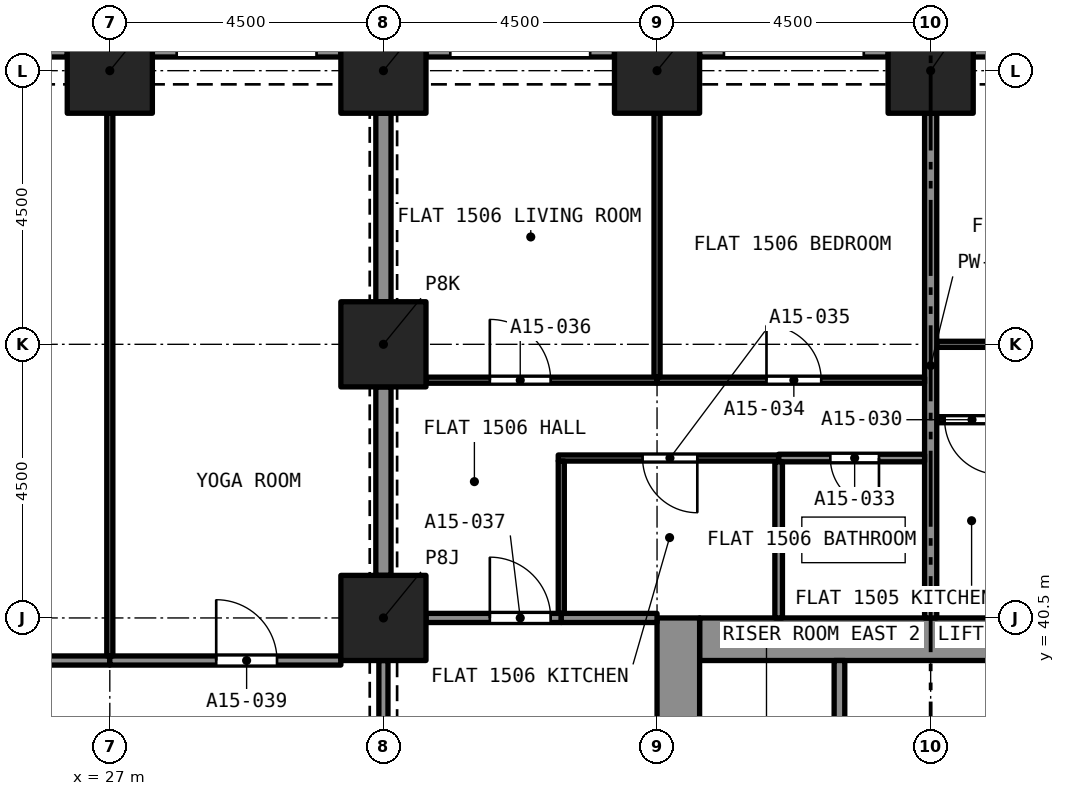
"""IFC4 building model, lengths in metres.
Left out: names, types, materials, properties, quantities, classifications, styles, units other than length and angle.
Written with IfcOpenShell. Run it as: python <this file> out.ifc"""

import sys

from ifc_helpers import new_model, si_unit, direction, frame, frame_2d, origin, origin_2d, place, context, subcontext, project, spatial, rectangle, extrude, element, fill, save


model = new_model("IFC4")
c1 = context("Model", 3, precision=1e-05, world=origin(), true_north=direction((0.0, 1.0)))
c2 = subcontext(c1, "Body", "Model", "MODEL_VIEW")
j1 = project(units=[si_unit("LENGTHUNIT", "METRE"), si_unit("PLANEANGLEUNIT", "RADIAN")], contexts=[c1])
p1 = place(None, origin())
s1 = spatial("IfcSite", under=j1, at=p1, CompositionType="ELEMENT")
p2 = place(p1, origin())
s2 = spatial("IfcBuilding", under=s1, at=p2, CompositionType="ELEMENT")
p3 = place(p2, frame((0.0, 0.0, 59.2)))
s3 = spatial("IfcBuildingStorey", under=s2, at=p3, CompositionType="ELEMENT", Elevation=59.2)
for number, where, z_axis, x_axis in (
    (1, (31.5, 40.5, 0.0), (0.0, 0.0, 1.0), (1.0, 0.0, 0.0)),
    (2, (31.5, 45.0, 0.0), (0.0, 0.0, 1.0), (1.0, 0.0, 0.0)),
    (3, (27.0, 49.5, 0.0), (0.0, 0.0, 1.0), (1.0, 0.0, 0.0)),
    (4, (31.5, 49.5, 0.0), (0.0, 0.0, 1.0), (1.0, 0.0, 0.0)),
    (5, (36.0, 49.5, 0.0), (0.0, 0.0, 1.0), (1.0, 0.0, 0.0)),
    (6, (40.5, 49.5, 0.0), (0.0, 0.0, 1.0), (1.0, 0.0, 0.0)),
):
    element("IfcColumn", number, at=place(p3, frame(where, z_axis=z_axis, x_axis=x_axis)), inside=s3, PredefinedType="COLUMN", context=c2, shape_type="SweptSolid", body=[
        extrude(rectangle(XDim=1.4, YDim=1.4, at=origin_2d()), origin(), (0.0, 0.0, 1.0), 3.2),
    ])
p4 = place(p3, frame((36.7, 40.15, 0.0), z_axis=(0.0, 0.0, 1.0), x_axis=(1.0, 0.0, 0.0)))
e7 = element("IfcWall", 7, at=p4, inside=s3, PredefinedType="SOLIDWALL", context=c2, shape_type="SweptSolid", body=[
    extrude(rectangle(XDim=7.6, YDim=0.7, at=frame_2d((3.8, 0.0))), origin(), (0.0, 0.0, 1.0), 3.2),
])
p5 = place(p3, frame((36.35, 27.0, 0.0), z_axis=(0.0, 0.0, 1.0), x_axis=(0.0, 1.0, 0.0)))
e8 = element("IfcWall", 8, at=p5, inside=s3, PredefinedType="SOLIDWALL", context=c2, shape_type="SweptSolid", body=[
    extrude(rectangle(XDim=13.5, YDim=0.7, at=frame_2d((6.75, 0.0))), origin(), (0.0, 0.0, 1.0), 3.2),
])
p6 = place(p5, frame((8.95, 0.0, 0.0)))
e9 = element("IfcOpeningElement", 9, at=p6, cuts=e8, PredefinedType="OPENING", context=c2, shape_type="SweptSolid", body=[
    extrude(rectangle(XDim=1.2, YDim=2.1, at=frame_2d((0.6, 1.05))), frame((0.0, 0.36, 0.0), z_axis=(0.0, -1.0, 0.0), x_axis=(1.0, 0.0, 0.0)), (0.0, 0.0, 1.0), 0.72),
])
p7 = place(p3, frame((41.2, 49.875, 0.0), z_axis=(0.0, 0.0, 1.0), x_axis=(1.0, 0.0, 0.0)))
e10 = element("IfcWall", 10, at=p7, inside=s3, PredefinedType="SOLIDWALL", context=c2, shape_type="SweptSolid", body=[
    extrude(rectangle(XDim=3.1, YDim=0.3, at=frame_2d((1.55, 0.0))), origin(), (0.0, 0.0, 1.0), 3.2),
])
p8 = place(p7, frame((0.4, 0.0, 0.45)))
e11 = element("IfcOpeningElement", 11, at=p8, cuts=e10, PredefinedType="OPENING", context=c2, shape_type="SweptSolid", body=[
    extrude(rectangle(XDim=2.3, YDim=1.95, at=frame_2d((1.15, 0.975))), frame((0.0, 0.16, 0.0), z_axis=(0.0, -1.0, 0.0), x_axis=(1.0, 0.0, 0.0)), (0.0, 0.0, 1.0), 0.32),
])
p9 = place(p3, frame((36.7, 49.875, 0.0), z_axis=(0.0, 0.0, 1.0), x_axis=(1.0, 0.0, 0.0)))
e12 = element("IfcWall", 12, at=p9, inside=s3, PredefinedType="SOLIDWALL", context=c2, shape_type="SweptSolid", body=[
    extrude(rectangle(XDim=3.1, YDim=0.3, at=frame_2d((1.55, 0.0))), origin(), (0.0, 0.0, 1.0), 3.2),
])
p10 = place(p9, frame((0.4, 0.0, 0.45)))
e13 = element("IfcOpeningElement", 13, at=p10, cuts=e12, PredefinedType="OPENING", context=c2, shape_type="SweptSolid", body=[
    extrude(rectangle(XDim=2.3, YDim=1.95, at=frame_2d((1.15, 0.975))), frame((0.0, 0.16, 0.0), z_axis=(0.0, -1.0, 0.0), x_axis=(1.0, 0.0, 0.0)), (0.0, 0.0, 1.0), 0.32),
])
p11 = place(p3, frame((32.2, 49.875, 0.0), z_axis=(0.0, 0.0, 1.0), x_axis=(1.0, 0.0, 0.0)))
e14 = element("IfcWall", 14, at=p11, inside=s3, PredefinedType="SOLIDWALL", context=c2, shape_type="SweptSolid", body=[
    extrude(rectangle(XDim=3.1, YDim=0.3, at=frame_2d((1.55, 0.0))), origin(), (0.0, 0.0, 1.0), 3.2),
])
p12 = place(p11, frame((0.4, 0.0, 0.45)))
e15 = element("IfcOpeningElement", 15, at=p12, cuts=e14, PredefinedType="OPENING", context=c2, shape_type="SweptSolid", body=[
    extrude(rectangle(XDim=2.3, YDim=1.95, at=frame_2d((1.15, 0.975))), frame((0.0, 0.16, 0.0), z_axis=(0.0, -1.0, 0.0), x_axis=(1.0, 0.0, 0.0)), (0.0, 0.0, 1.0), 0.32),
])
p13 = place(p3, frame((27.7, 49.875, 0.0), z_axis=(0.0, 0.0, 1.0), x_axis=(1.0, 0.0, 0.0)))
e16 = element("IfcWall", 16, at=p13, inside=s3, PredefinedType="SOLIDWALL", context=c2, shape_type="SweptSolid", body=[
    extrude(rectangle(XDim=3.1, YDim=0.3, at=frame_2d((1.55, 0.0))), origin(), (0.0, 0.0, 1.0), 3.2),
])
p14 = place(p13, frame((0.4, 0.0, 0.45)))
e17 = element("IfcOpeningElement", 17, at=p14, cuts=e16, PredefinedType="OPENING", context=c2, shape_type="SweptSolid", body=[
    extrude(rectangle(XDim=2.3, YDim=1.95, at=frame_2d((1.15, 0.975))), frame((0.0, 0.16, 0.0), z_axis=(0.0, -1.0, 0.0), x_axis=(1.0, 0.0, 0.0)), (0.0, 0.0, 1.0), 0.32),
])
p15 = place(p3, frame((23.2, 49.875, 0.0), z_axis=(0.0, 0.0, 1.0), x_axis=(1.0, 0.0, 0.0)))
e18 = element("IfcWall", 18, at=p15, inside=s3, PredefinedType="SOLIDWALL", context=c2, shape_type="SweptSolid", body=[
    extrude(rectangle(XDim=3.1, YDim=0.3, at=frame_2d((1.55, 0.0))), origin(), (0.0, 0.0, 1.0), 3.2),
])
p16 = place(p15, frame((0.4, 0.0, 0.45)))
e19 = element("IfcOpeningElement", 19, at=p16, cuts=e18, PredefinedType="OPENING", context=c2, shape_type="SweptSolid", body=[
    extrude(rectangle(XDim=2.3, YDim=1.95, at=frame_2d((1.15, 0.975))), frame((0.0, 0.16, 0.0), z_axis=(0.0, -1.0, 0.0), x_axis=(1.0, 0.0, 0.0)), (0.0, 0.0, 1.0), 0.32),
])
p17 = place(p3, frame((40.6, 45.0, 0.0), z_axis=(0.0, 0.0, 1.0), x_axis=(1.0, 0.0, 0.0)))
e20 = element("IfcWall", 20, at=p17, inside=s3, PredefinedType="PARTITIONING", context=c2, shape_type="SweptSolid", body=[
    extrude(rectangle(XDim=4.4, YDim=0.1, at=frame_2d((2.2, 0.0))), origin(), (0.0, 0.0, 1.0), 2.9),
])
p18 = place(p17, frame((1.7, 0.0, 0.0)))
e21 = element("IfcOpeningElement", 21, at=p18, cuts=e20, PredefinedType="OPENING", context=c2, shape_type="SweptSolid", body=[
    extrude(rectangle(XDim=0.9, YDim=2.1, at=frame_2d((0.45, 1.05))), frame((0.0, 0.06, 0.0), z_axis=(0.0, -1.0, 0.0), x_axis=(1.0, 0.0, 0.0)), (0.0, 0.0, 1.0), 0.12),
])
p19 = place(p3, frame((41.809, 43.76, 0.0), z_axis=(0.0, 0.0, 1.0), x_axis=(-1.0, 0.0, 0.0)))
e22 = element("IfcWall", 22, at=p19, inside=s3, PredefinedType="PARTITIONING", context=c2, shape_type="SweptSolid", body=[
    extrude(rectangle(XDim=1.209, YDim=0.1, at=frame_2d((0.604, 0.0))), origin(), (0.0, 0.0, 1.0), 2.9),
])
p20 = place(p19, frame((0.179, 0.0, 0.0)))
e23 = element("IfcOpeningElement", 23, at=p20, cuts=e22, PredefinedType="OPENING", context=c2, shape_type="SweptSolid", body=[
    extrude(rectangle(XDim=0.9, YDim=2.1, at=frame_2d((0.45, 1.05))), frame((0.0, 0.06, 0.0), z_axis=(0.0, -1.0, 0.0), x_axis=(1.0, 0.0, 0.0)), (0.0, 0.0, 1.0), 0.12),
])
p21 = place(p3, frame((40.5, 40.5, 0.0), z_axis=(0.0, 0.0, 1.0), x_axis=(0.0, 1.0, 0.0)))
e24 = element("IfcWall", 24, at=p21, inside=s3, PredefinedType="PARTITIONING", context=c2, shape_type="SweptSolid", body=[
    extrude(rectangle(XDim=8.3, YDim=0.2, at=frame_2d((4.15, 0.0))), origin(), (0.0, 0.0, 1.0), 2.9),
])
p22 = place(p3, frame((40.4, 43.13, 0.0), z_axis=(0.0, 0.0, 1.0), x_axis=(-1.0, 0.0, 0.0)))
e25 = element("IfcWall", 25, at=p22, inside=s3, PredefinedType="PARTITIONING", context=c2, shape_type="SweptSolid", body=[
    extrude(rectangle(XDim=2.4, YDim=0.125, at=frame_2d((1.2, 0.0))), origin(), (0.0, 0.0, 1.0), 2.9),
])
p23 = place(p22, frame((0.75, 0.0, 0.0)))
e26 = element("IfcOpeningElement", 26, at=p23, cuts=e25, PredefinedType="OPENING", context=c2, shape_type="SweptSolid", body=[
    extrude(rectangle(XDim=0.8, YDim=2.1, at=frame_2d((0.4, 1.05))), frame((0.0, 0.073, 0.0), z_axis=(0.0, -1.0, 0.0), x_axis=(1.0, 0.0, 0.0)), (0.0, 0.0, 1.0), 0.145),
])
p24 = place(p3, frame((38.0, 40.5, 0.0), z_axis=(0.0, 0.0, 1.0), x_axis=(0.0, 1.0, 0.0)))
e27 = element("IfcWall", 27, at=p24, inside=s3, PredefinedType="PARTITIONING", context=c2, shape_type="SweptSolid", body=[
    extrude(rectangle(XDim=2.567, YDim=0.125, at=frame_2d((1.284, 0.0))), origin(), (0.0, 0.0, 1.0), 2.9),
])
p25 = place(p3, frame((36.0, 44.41, 0.0), z_axis=(0.0, 0.0, 1.0), x_axis=(1.0, 0.0, 0.0)))
e28 = element("IfcWall", 28, at=p25, inside=s3, PredefinedType="PARTITIONING", context=c2, shape_type="SweptSolid", body=[
    extrude(rectangle(XDim=4.4, YDim=0.1, at=frame_2d((2.2, 0.0))), origin(), (0.0, 0.0, 1.0), 2.9),
])
p26 = place(p25, frame((1.8, 0.0, 0.0)))
e29 = element("IfcOpeningElement", 29, at=p26, cuts=e28, PredefinedType="OPENING", context=c2, shape_type="SweptSolid", body=[
    extrude(rectangle(XDim=0.9, YDim=2.1, at=frame_2d((0.45, 1.05))), frame((0.0, 0.06, 0.0), z_axis=(0.0, -1.0, 0.0), x_axis=(1.0, 0.0, 0.0)), (0.0, 0.0, 1.0), 0.12),
])
p27 = place(p3, frame((36.0, 44.46, 0.0), z_axis=(0.0, 0.0, 1.0), x_axis=(0.0, 1.0, 0.0)))
e30 = element("IfcWall", 30, at=p27, inside=s3, PredefinedType="PARTITIONING", context=c2, shape_type="SweptSolid", body=[
    extrude(rectangle(XDim=4.34, YDim=0.1, at=frame_2d((2.17, 0.0))), origin(), (0.0, 0.0, 1.0), 2.9),
])
p28 = place(p3, frame((38.0, 43.13, 0.0), z_axis=(0.0, 0.0, 1.0), x_axis=(-1.0, 0.0, 0.0)))
e31 = element("IfcWall", 31, at=p28, inside=s3, PredefinedType="PARTITIONING", context=c2, shape_type="SweptSolid", body=[
    extrude(rectangle(XDim=3.625, YDim=0.1, at=frame_2d((1.812, 0.0))), origin(), (0.0, 0.0, 1.0), 2.9),
])
p29 = place(p28, frame((1.337, 0.0, 0.0)))
e32 = element("IfcOpeningElement", 32, at=p29, cuts=e31, PredefinedType="OPENING", context=c2, shape_type="SweptSolid", body=[
    extrude(rectangle(XDim=0.9, YDim=2.1, at=frame_2d((0.45, 1.05))), frame((0.0, 0.06, 0.0), z_axis=(0.0, -1.0, 0.0), x_axis=(1.0, 0.0, 0.0)), (0.0, 0.0, 1.0), 0.12),
])
p30 = place(p3, frame((34.425, 40.575, 0.0), z_axis=(0.0, 0.0, 1.0), x_axis=(0.0, 1.0, 0.0)))
e33 = element("IfcWall", 33, at=p30, inside=s3, PredefinedType="PARTITIONING", context=c2, shape_type="SweptSolid", body=[
    extrude(rectangle(XDim=2.505, YDim=0.1, at=frame_2d((1.252, 0.0))), origin(), (0.0, 0.0, 1.0), 2.9),
])
p31 = place(p3, frame((32.2, 44.41, 0.0), z_axis=(0.0, 0.0, 1.0), x_axis=(1.0, 0.0, 0.0)))
e34 = element("IfcWall", 34, at=p31, inside=s3, PredefinedType="PARTITIONING", context=c2, shape_type="SweptSolid", body=[
    extrude(rectangle(XDim=3.8, YDim=0.1, at=frame_2d((1.9, 0.0))), origin(), (0.0, 0.0, 1.0), 2.9),
])
p32 = place(p31, frame((1.05, 0.0, 0.0)))
e35 = element("IfcOpeningElement", 35, at=p32, cuts=e34, PredefinedType="OPENING", context=c2, shape_type="SweptSolid", body=[
    extrude(rectangle(XDim=1.0, YDim=2.1, at=frame_2d((0.5, 1.05))), frame((0.0, 0.06, 0.0), z_axis=(0.0, -1.0, 0.0), x_axis=(1.0, 0.0, 0.0)), (0.0, 0.0, 1.0), 0.12),
])
p33 = place(p3, frame((31.5, 41.2, 0.0), z_axis=(0.0, 0.0, 1.0), x_axis=(0.0, 1.0, 0.0)))
e36 = element("IfcWall", 36, at=p33, inside=s3, PredefinedType="PARTITIONING", context=c2, shape_type="SweptSolid", body=[
    extrude(rectangle(XDim=3.1, YDim=0.25, at=frame_2d((1.55, 0.0))), origin(), (0.0, 0.0, 1.0), 2.38),
])
p34 = place(p3, frame((32.2, 40.5, 0.0), z_axis=(0.0, 0.0, 1.0), x_axis=(1.0, 0.0, 0.0)))
e37 = element("IfcWall", 37, at=p34, inside=s3, PredefinedType="PARTITIONING", context=c2, shape_type="SweptSolid", body=[
    extrude(rectangle(XDim=2.225, YDim=0.15, at=frame_2d((1.113, 0.0))), origin(), (0.0, 0.0, 1.0), 2.9),
])
p35 = place(p34, frame((1.05, 0.0, 0.0)))
e38 = element("IfcOpeningElement", 38, at=p35, cuts=e37, PredefinedType="OPENING", context=c2, shape_type="SweptSolid", body=[
    extrude(rectangle(XDim=1.0, YDim=2.1, at=frame_2d((0.5, 1.05))), frame((0.0, 0.085, 0.0), z_axis=(0.0, -1.0, 0.0), x_axis=(1.0, 0.0, 0.0)), (0.0, 0.0, 1.0), 0.17),
])
p36 = place(p3, frame((34.425, 40.5, 0.0), z_axis=(0.0, 0.0, 1.0), x_axis=(1.0, 0.0, 0.0)))
e39 = element("IfcWall", 39, at=p36, inside=s3, PredefinedType="PARTITIONING", context=c2, shape_type="SweptSolid", body=[
    extrude(rectangle(XDim=1.575, YDim=0.15, at=frame_2d((0.788, 0.0))), origin(), (0.0, 0.0, 1.0), 2.9),
])
p37 = place(p3, frame((31.5, 45.7, 0.0), z_axis=(0.0, 0.0, 1.0), x_axis=(0.0, 1.0, 0.0)))
e40 = element("IfcWall", 40, at=p37, inside=s3, PredefinedType="PARTITIONING", context=c2, shape_type="SweptSolid", body=[
    extrude(rectangle(XDim=3.1, YDim=0.25, at=frame_2d((1.55, 0.0))), origin(), (0.0, 0.0, 1.0), 2.38),
])
p38 = place(p3, frame((18.7, 39.8, 0.0), z_axis=(0.0, 0.0, 1.0), x_axis=(1.0, 0.0, 0.0)))
e41 = element("IfcWall", 41, at=p38, inside=s3, PredefinedType="PARTITIONING", context=c2, shape_type="SweptSolid", body=[
    extrude(rectangle(XDim=8.3, YDim=0.15, at=frame_2d((4.15, 0.0))), origin(), (0.0, 0.0, 1.0), 2.75),
])
p39 = place(p38, frame((3.3, 0.0, 0.0)))
e42 = element("IfcOpeningElement", 42, at=p39, cuts=e41, PredefinedType="OPENING", context=c2, shape_type="SweptSolid", body=[
    extrude(rectangle(XDim=1.0, YDim=2.1, at=frame_2d((0.5, 1.05))), frame((0.0, 0.085, 0.0), z_axis=(0.0, -1.0, 0.0), x_axis=(1.0, 0.0, 0.0)), (0.0, 0.0, 1.0), 0.17),
])
p40 = place(p3, frame((27.0, 39.8, 0.0), z_axis=(0.0, 0.0, 1.0), x_axis=(1.0, 0.0, 0.0)))
e43 = element("IfcWall", 43, at=p40, inside=s3, PredefinedType="PARTITIONING", context=c2, shape_type="SweptSolid", body=[
    extrude(rectangle(XDim=3.8, YDim=0.15, at=frame_2d((1.9, 0.0))), origin(), (0.0, 0.0, 1.0), 2.75),
])
p41 = place(p40, frame((1.75, 0.0, 0.0)))
e44 = element("IfcOpeningElement", 44, at=p41, cuts=e43, PredefinedType="OPENING", context=c2, shape_type="SweptSolid", body=[
    extrude(rectangle(XDim=1.0, YDim=2.1, at=frame_2d((0.5, 1.05))), frame((0.0, 0.085, 0.0), z_axis=(0.0, -1.0, 0.0), x_axis=(1.0, 0.0, 0.0)), (0.0, 0.0, 1.0), 0.17),
])
p42 = place(p3, frame((31.5, 36.7, 0.0), z_axis=(0.0, 0.0, 1.0), x_axis=(0.0, 1.0, 0.0)))
e45 = element("IfcWall", 45, at=p42, inside=s3, PredefinedType="PARTITIONING", context=c2, shape_type="SweptSolid", body=[
    extrude(rectangle(XDim=3.1, YDim=0.15, at=frame_2d((1.55, 0.0))), origin(), (0.0, 0.0, 1.0), 2.38),
])
p43 = place(p42, frame((0.95, 0.0, 0.0)))
e46 = element("IfcOpeningElement", 46, at=p43, cuts=e45, PredefinedType="OPENING", context=c2, shape_type="SweptSolid", body=[
    extrude(rectangle(XDim=1.2, YDim=2.1, at=frame_2d((0.6, 1.05))), frame((0.0, 0.085, 0.0), z_axis=(0.0, -1.0, 0.0), x_axis=(1.0, 0.0, 0.0)), (0.0, 0.0, 1.0), 0.17),
])
p44 = place(p3, frame((27.0, 39.875, 0.0), z_axis=(0.0, 0.0, 1.0), x_axis=(0.0, 1.0, 0.0)))
e47 = element("IfcWall", 47, at=p44, inside=s3, PredefinedType="PARTITIONING", context=c2, shape_type="SweptSolid", body=[
    extrude(rectangle(XDim=8.925, YDim=0.1, at=frame_2d((4.462, 0.0))), origin(), (0.0, 0.0, 1.0), 2.75),
])
p45 = place(p3, frame((39.0, 37.5, 0.0), z_axis=(0.0, 0.0, 1.0), x_axis=(0.0, 1.0, 0.0)))
e48 = element("IfcWall", 48, at=p45, inside=s3, PredefinedType="SOLIDWALL", context=c2, shape_type="SweptSolid", body=[
    extrude(rectangle(XDim=2.3, YDim=0.175, at=frame_2d((1.15, 0.0))), origin(), (0.0, 0.0, 1.0), 2.9),
])
p46 = place(p20, origin())
e49 = element("IfcDoor", 49, at=p46, inside=s3, OperationType="SINGLE_SWING_RIGHT", PredefinedType="DOOR", context=c2, shape_type="SweptSolid", body=[
    extrude(rectangle(XDim=0.9, YDim=2.1, at=frame_2d((0.45, 1.05))), frame((0.0, 0.025, 0.0), z_axis=(0.0, -1.0, 0.0), x_axis=(1.0, 0.0, 0.0)), (0.0, 0.0, 1.0), 0.05),
])
fill(e23, e49)
p47 = place(p23, origin())
e50 = element("IfcDoor", 50, at=p47, inside=s3, OperationType="SINGLE_SWING_LEFT", PredefinedType="DOOR", context=c2, shape_type="SweptSolid", body=[
    extrude(rectangle(XDim=0.8, YDim=2.1, at=frame_2d((0.4, 1.05))), frame((0.0, 0.025, 0.0), z_axis=(0.0, -1.0, 0.0), x_axis=(1.0, 0.0, 0.0)), (0.0, 0.0, 1.0), 0.05),
])
fill(e26, e50)
p48 = place(p26, origin())
e51 = element("IfcDoor", 51, at=p48, inside=s3, OperationType="SINGLE_SWING_RIGHT", PredefinedType="DOOR", context=c2, shape_type="SweptSolid", body=[
    extrude(rectangle(XDim=0.9, YDim=2.1, at=frame_2d((0.45, 1.05))), frame((0.0, 0.025, 0.0), z_axis=(0.0, -1.0, 0.0), x_axis=(1.0, 0.0, 0.0)), (0.0, 0.0, 1.0), 0.05),
])
fill(e29, e51)
p49 = place(p29, origin())
e52 = element("IfcDoor", 52, at=p49, inside=s3, OperationType="SINGLE_SWING_LEFT", PredefinedType="DOOR", context=c2, shape_type="SweptSolid", body=[
    extrude(rectangle(XDim=0.9, YDim=2.1, at=frame_2d((0.45, 1.05))), frame((0.0, 0.025, 0.0), z_axis=(0.0, -1.0, 0.0), x_axis=(1.0, 0.0, 0.0)), (0.0, 0.0, 1.0), 0.05),
])
fill(e32, e52)
p50 = place(p32, origin())
e53 = element("IfcDoor", 53, at=p50, inside=s3, OperationType="SINGLE_SWING_LEFT", PredefinedType="DOOR", context=c2, shape_type="SweptSolid", body=[
    extrude(rectangle(XDim=1.0, YDim=2.1, at=frame_2d((0.5, 1.05))), frame((0.0, 0.025, 0.0), z_axis=(0.0, -1.0, 0.0), x_axis=(1.0, 0.0, 0.0)), (0.0, 0.0, 1.0), 0.05),
])
fill(e35, e53)
p51 = place(p35, origin())
e54 = element("IfcDoor", 54, at=p51, inside=s3, OperationType="SINGLE_SWING_RIGHT", PredefinedType="DOOR", context=c2, shape_type="SweptSolid", body=[
    extrude(rectangle(XDim=1.0, YDim=2.1, at=frame_2d((0.5, 1.05))), frame((0.0, 0.025, 0.0), z_axis=(0.0, -1.0, 0.0), x_axis=(1.0, 0.0, 0.0)), (0.0, 0.0, 1.0), 0.05),
])
fill(e38, e54)
p52 = place(p41, origin())
e55 = element("IfcDoor", 55, at=p52, inside=s3, OperationType="SINGLE_SWING_RIGHT", PredefinedType="DOOR", context=c2, shape_type="SweptSolid", body=[
    extrude(rectangle(XDim=1.0, YDim=2.1, at=frame_2d((0.5, 1.05))), frame((0.0, 0.025, 0.0), z_axis=(0.0, -1.0, 0.0), x_axis=(1.0, 0.0, 0.0)), (0.0, 0.0, 1.0), 0.05),
])
fill(e44, e55)
save(model, sys.argv[1])
